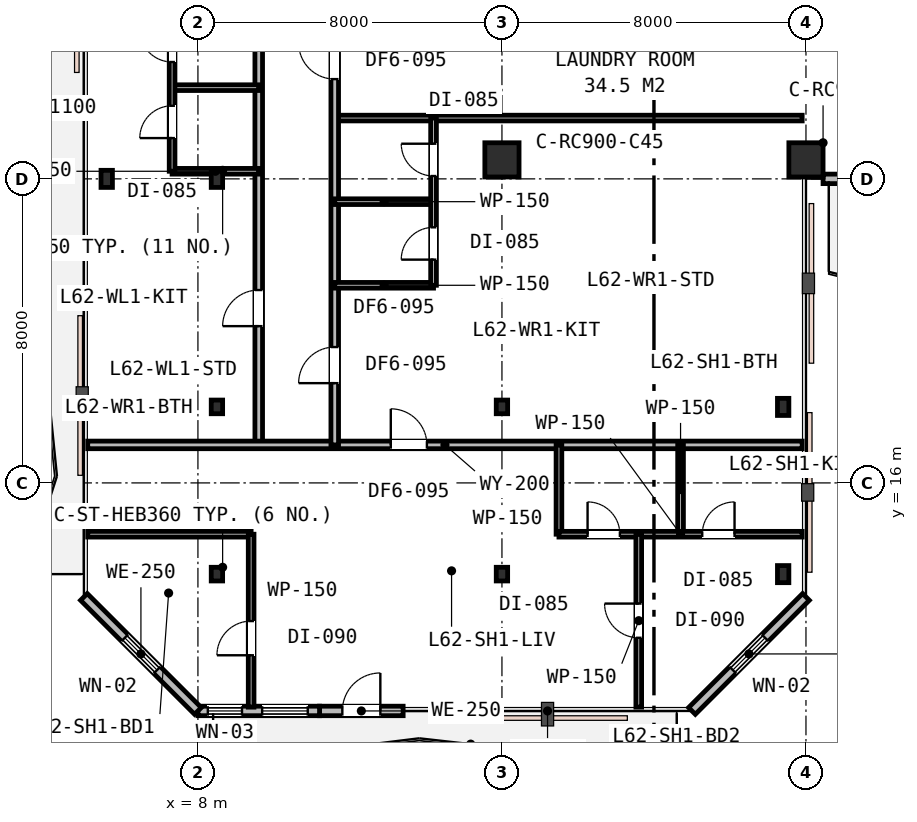
"""IFC4 building model, lengths in metres.
Left out: names, types, materials, properties, quantities, classifications, styles, units other than length and angle.
Written with IfcOpenShell. Run it as: python <this file> out.ifc"""

import sys

from ifc_helpers import new_model, si_unit, direction, frame, frame_2d, origin, origin_2d, place, context, subcontext, project, spatial, rectangle, i_section, extrude, element, fill, save


model = new_model("IFC4")
c1 = context("Model", 3, precision=1e-05, world=origin(), true_north=direction((0.0, 1.0)))
c2 = subcontext(c1, "Body", "Model", "MODEL_VIEW")
j1 = project(units=[si_unit("LENGTHUNIT", "METRE"), si_unit("PLANEANGLEUNIT", "RADIAN")], contexts=[c1])
p1 = place(None, origin())
s1 = spatial("IfcSite", under=j1, at=p1, CompositionType="ELEMENT")
p2 = place(p1, origin())
s2 = spatial("IfcBuilding", under=s1, at=p2, CompositionType="ELEMENT")
p3 = place(p2, frame((0.0, 0.0, 241.2)))
s3 = spatial("IfcBuildingStorey", under=s2, at=p3, CompositionType="ELEMENT", Elevation=241.2)
p4 = place(p3, frame((8.5, 24.0, 0.0), z_axis=(0.0, 0.0, 1.0), x_axis=(1.0, 0.0, 0.0)))
e1 = element("IfcColumn", 1, at=p4, inside=s3, PredefinedType="COLUMN", context=c2, shape_type="SweptSolid", body=[
    extrude(i_section(OverallWidth=0.3, OverallDepth=0.45, WebThickness=0.014, FlangeThickness=0.026, FilletRadius=0.027, at=origin_2d()), origin(), (0.0, 0.0, 1.0), 3.8),
])
for number, where, z_axis, x_axis in (
    (2, (16.0, 24.5, 0.0), (0.0, 0.0, 1.0), (1.0, 0.0, 0.0)),
    (3, (24.0, 24.5, 0.0), (0.0, 0.0, 1.0), (1.0, 0.0, 0.0)),
):
    element("IfcColumn", number, at=place(p3, frame(where, z_axis=z_axis, x_axis=x_axis)), inside=s3, PredefinedType="COLUMN", context=c2, shape_type="SweptSolid", body=[
        extrude(rectangle(XDim=0.9, YDim=0.9, at=origin_2d()), origin(), (0.0, 0.0, 1.0), 3.8),
    ])
for number, where, z_axis, x_axis in (
    (4, (5.6, 24.0, 0.0), (0.0, 0.0, 1.0), (1.0, 0.0, 0.0)),
    (5, (23.4, 13.6, 0.0), (0.0, 0.0, 1.0), (1.0, 0.0, 0.0)),
    (6, (23.4, 18.0, 0.0), (0.0, 0.0, 1.0), (1.0, 0.0, 0.0)),
):
    element("IfcColumn", number, at=place(p3, frame(where, z_axis=z_axis, x_axis=x_axis)), inside=s3, PredefinedType="COLUMN", context=c2, shape_type="SweptSolid", body=[
        extrude(i_section(OverallWidth=0.3, OverallDepth=0.45, WebThickness=0.014, FlangeThickness=0.026, FilletRadius=0.027, at=origin_2d()), origin(), (0.0, 0.0, 1.0), 3.8),
    ])
for number, where, z_axis, x_axis in (
    (7, (8.5, 13.6, 0.0), (0.0, 0.0, 1.0), (1.0, 0.0, 0.0)),
    (8, (16.0, 13.6, 0.0), (0.0, 0.0, 1.0), (1.0, 0.0, 0.0)),
    (9, (8.5, 18.0, 0.0), (0.0, 0.0, 1.0), (1.0, 0.0, 0.0)),
    (10, (16.0, 18.0, 0.0), (0.0, 0.0, 1.0), (1.0, 0.0, 0.0)),
):
    element("IfcColumn", number, at=place(p3, frame(where, z_axis=z_axis, x_axis=x_axis)), inside=s3, PredefinedType="COLUMN", context=c2, shape_type="SweptSolid", body=[
        extrude(i_section(OverallWidth=0.3, OverallDepth=0.36, WebThickness=0.013, FlangeThickness=0.022, FilletRadius=0.027, at=origin_2d()), origin(), (0.0, 0.0, 1.0), 3.8),
    ])
p5 = place(p3, frame((11.2, 10.0, 0.0), z_axis=(0.0, 0.0, 1.0), x_axis=(1.0, 0.0, 0.0)))
e11 = element("IfcWall", 11, at=p5, inside=s3, PredefinedType="STANDARD", context=c2, shape_type="SweptSolid", body=[
    extrude(rectangle(XDim=2.2, YDim=0.25, at=frame_2d((1.1, 0.0))), origin(), (0.0, 0.0, 1.0), 3.53),
])
p6 = place(p5, frame((0.6, 0.0, 0.0)))
e12 = element("IfcOpeningElement", 12, at=p6, cuts=e11, PredefinedType="OPENING", context=c2, shape_type="SweptSolid", body=[
    extrude(rectangle(XDim=1.0, YDim=2.15, at=frame_2d((0.5, 1.075))), frame((0.0, 0.135, 0.0), z_axis=(0.0, -1.0, 0.0), x_axis=(1.0, 0.0, 0.0)), (0.0, 0.0, 1.0), 0.27),
])
p7 = place(p3, frame((8.0, 10.0, 0.0), z_axis=(0.0, 0.0, 1.0), x_axis=(1.0, 0.0, 0.0)))
e13 = element("IfcWall", 13, at=p7, inside=s3, PredefinedType="STANDARD", context=c2, shape_type="SweptSolid", body=[
    extrude(rectangle(XDim=3.2, YDim=0.25, at=frame_2d((1.6, 0.0))), origin(), (0.0, 0.0, 1.0), 3.53),
])
p8 = place(p7, frame((0.26, 0.0, 0.9)))
e14 = element("IfcOpeningElement", 14, at=p8, cuts=e13, PredefinedType="OPENING", context=c2, shape_type="SweptSolid", body=[
    extrude(rectangle(XDim=0.9, YDim=1.55, at=frame_2d((0.45, 0.775))), frame((0.0, 0.135, 0.0), z_axis=(0.0, -1.0, 0.0), x_axis=(1.0, 0.0, 0.0)), (0.0, 0.0, 1.0), 0.27),
])
p9 = place(p7, frame((1.69, 0.0, 0.85)))
e15 = element("IfcOpeningElement", 15, at=p9, cuts=e13, PredefinedType="OPENING", context=c2, shape_type="SweptSolid", body=[
    extrude(rectangle(XDim=1.2, YDim=1.6, at=frame_2d((0.6, 0.8))), frame((0.0, 0.135, 0.0), z_axis=(0.0, -1.0, 0.0), x_axis=(1.0, 0.0, 0.0)), (0.0, 0.0, 1.0), 0.27),
])
p10 = place(p3, frame((21.0, 10.0, 0.0), z_axis=(0.0, 0.0, 1.0), x_axis=(0.707106781187, 0.707106781187, 0.0)))
e16 = element("IfcWall", 16, at=p10, inside=s3, PredefinedType="STANDARD", context=c2, shape_type="SweptSolid", body=[
    extrude(rectangle(XDim=4.243, YDim=0.25, at=frame_2d((2.121, 0.0))), origin(), (0.0, 0.0, 1.0), 3.53),
])
p11 = place(p10, frame((1.521, 0.0, 0.85)))
e17 = element("IfcOpeningElement", 17, at=p11, cuts=e16, PredefinedType="OPENING", context=c2, shape_type="SweptSolid", body=[
    extrude(rectangle(XDim=1.2, YDim=1.6, at=frame_2d((0.6, 0.8))), frame((0.0, 0.135, 0.0), z_axis=(0.0, -1.0, 0.0), x_axis=(1.0, 0.0, 0.0)), (0.0, 0.0, 1.0), 0.27),
])
p12 = place(p3, frame((24.45, 24.0, 0.0), z_axis=(0.0, 0.0, 1.0), x_axis=(1.0, 0.0, 0.0)))
e18 = element("IfcWall", 18, at=p12, inside=s3, PredefinedType="STANDARD", context=c2, shape_type="SweptSolid", body=[
    extrude(rectangle(XDim=0.95, YDim=0.25, at=frame_2d((0.475, 0.0))), origin(), (0.0, 0.0, 1.0), 3.27),
])
p13 = place(p3, frame((5.0, 13.0, 0.0), z_axis=(0.0, 0.0, 1.0), x_axis=(0.707106781187, -0.707106781187, 0.0)))
e19 = element("IfcWall", 19, at=p13, inside=s3, PredefinedType="STANDARD", context=c2, shape_type="SweptSolid", body=[
    extrude(rectangle(XDim=4.243, YDim=0.25, at=frame_2d((2.121, 0.0))), origin(), (0.0, 0.0, 1.0), 3.53),
])
p14 = place(p13, frame((1.521, 0.0, 0.85)))
e20 = element("IfcOpeningElement", 20, at=p14, cuts=e19, PredefinedType="OPENING", context=c2, shape_type="SweptSolid", body=[
    extrude(rectangle(XDim=1.2, YDim=1.6, at=frame_2d((0.6, 0.8))), frame((0.0, 0.135, 0.0), z_axis=(0.0, -1.0, 0.0), x_axis=(1.0, 0.0, 0.0)), (0.0, 0.0, 1.0), 0.27),
])
p15 = place(p3, frame((9.6, 17.0, 0.0), z_axis=(0.0, 0.0, 1.0), x_axis=(0.0, 1.0, 0.0)))
e21 = element("IfcWall", 21, at=p15, inside=s3, PredefinedType="PARTITIONING", context=c2, shape_type="SweptSolid", body=[
    extrude(rectangle(XDim=25.9, YDim=0.2, at=frame_2d((12.95, 0.0))), origin(), (0.0, 0.0, 1.0), 3.16),
])
p16 = place(p15, frame((12.045, 0.0, 0.0)))
e22 = element("IfcOpeningElement", 22, at=p16, cuts=e21, PredefinedType="OPENING", context=c2, shape_type="SweptSolid", body=[
    extrude(rectangle(XDim=0.95, YDim=2.15, at=frame_2d((0.475, 1.075))), frame((0.0, 0.11, 0.0), z_axis=(0.0, -1.0, 0.0), x_axis=(1.0, 0.0, 0.0)), (0.0, 0.0, 1.0), 0.22),
])
p17 = place(p15, frame((3.125, 0.0, 0.0)))
e23 = element("IfcOpeningElement", 23, at=p17, cuts=e21, PredefinedType="OPENING", context=c2, shape_type="SweptSolid", body=[
    extrude(rectangle(XDim=0.95, YDim=2.15, at=frame_2d((0.475, 1.075))), frame((0.0, 0.11, 0.0), z_axis=(0.0, -1.0, 0.0), x_axis=(1.0, 0.0, 0.0)), (0.0, 0.0, 1.0), 0.22),
])
p18 = place(p3, frame((5.1, 17.0, 0.0), z_axis=(0.0, 0.0, 1.0), x_axis=(1.0, 0.0, 0.0)))
e24 = element("IfcWall", 24, at=p18, inside=s3, PredefinedType="PARTITIONING", context=c2, shape_type="SweptSolid", body=[
    extrude(rectangle(XDim=18.8, YDim=0.2, at=frame_2d((9.4, 0.0))), origin(), (0.0, 0.0, 1.0), 3.16),
])
p19 = place(p18, frame((7.975, 0.0, 0.0)))
e25 = element("IfcOpeningElement", 25, at=p19, cuts=e24, PredefinedType="OPENING", context=c2, shape_type="SweptSolid", body=[
    extrude(rectangle(XDim=0.95, YDim=2.15, at=frame_2d((0.475, 1.075))), frame((0.0, 0.11, 0.0), z_axis=(0.0, -1.0, 0.0), x_axis=(1.0, 0.0, 0.0)), (0.0, 0.0, 1.0), 0.22),
])
for number, where, z_axis, x_axis in (
    (26, (7.32, 24.2, 0.0), (0.0, 0.0, 1.0), (1.0, 0.0, 0.0)),
    (27, (7.32, 26.4, 0.0), (0.0, 0.0, 1.0), (1.0, 0.0, 0.0)),
):
    element("IfcWall", number, at=place(p3, frame(where, z_axis=z_axis, x_axis=x_axis)), inside=s3, PredefinedType="PARTITIONING", context=c2, shape_type="SweptSolid", body=[
        extrude(rectangle(XDim=2.28, YDim=0.15, at=frame_2d((1.14, 0.0))), origin(), (0.0, 0.0, 1.0), 3.16),
    ])
p20 = place(p3, frame((7.32, 24.2, 0.0), z_axis=(0.0, 0.0, 1.0), x_axis=(0.0, 1.0, 0.0)))
e28 = element("IfcWall", 28, at=p20, inside=s3, PredefinedType="PARTITIONING", context=c2, shape_type="SweptSolid", body=[
    extrude(rectangle(XDim=4.4, YDim=0.15, at=frame_2d((2.2, 0.0))), origin(), (0.0, 0.0, 1.0), 3.16),
])
p21 = place(p20, frame((0.873, 0.0, 0.0)))
e29 = element("IfcOpeningElement", 29, at=p21, cuts=e28, PredefinedType="OPENING", context=c2, shape_type="SweptSolid", body=[
    extrude(rectangle(XDim=0.85, YDim=2.15, at=frame_2d((0.425, 1.075))), frame((0.0, 0.085, 0.0), z_axis=(0.0, -1.0, 0.0), x_axis=(1.0, 0.0, 0.0)), (0.0, 0.0, 1.0), 0.17),
])
p22 = place(p20, frame((2.875, 0.0, 0.0)))
e30 = element("IfcOpeningElement", 30, at=p22, cuts=e28, PredefinedType="OPENING", context=c2, shape_type="SweptSolid", body=[
    extrude(rectangle(XDim=0.85, YDim=2.15, at=frame_2d((0.425, 1.075))), frame((0.0, 0.085, 0.0), z_axis=(0.0, -1.0, 0.0), x_axis=(1.0, 0.0, 0.0)), (0.0, 0.0, 1.0), 0.17),
])
p23 = place(p3, frame((11.6, 25.6, 0.0), z_axis=(0.0, 0.0, 1.0), x_axis=(1.0, 0.0, 0.0)))
e31 = element("IfcWall", 31, at=p23, inside=s3, PredefinedType="PARTITIONING", context=c2, shape_type="SweptSolid", body=[
    extrude(rectangle(XDim=12.3, YDim=0.15, at=frame_2d((6.15, 0.0))), origin(), (0.0, 0.0, 1.0), 3.16),
])
p24 = place(p3, frame((11.6, 17.0, 0.0), z_axis=(0.0, 0.0, 1.0), x_axis=(0.0, 1.0, 0.0)))
e32 = element("IfcWall", 32, at=p24, inside=s3, PredefinedType="PARTITIONING", context=c2, shape_type="SweptSolid", body=[
    extrude(rectangle(XDim=11.6, YDim=0.2, at=frame_2d((5.8, 0.0))), origin(), (0.0, 0.0, 1.0), 3.16),
])
p25 = place(p24, frame((9.625, 0.0, 0.0)))
e33 = element("IfcOpeningElement", 33, at=p25, cuts=e32, PredefinedType="OPENING", context=c2, shape_type="SweptSolid", body=[
    extrude(rectangle(XDim=0.95, YDim=2.15, at=frame_2d((0.475, 1.075))), frame((0.0, 0.11, 0.0), z_axis=(0.0, -1.0, 0.0), x_axis=(1.0, 0.0, 0.0)), (0.0, 0.0, 1.0), 0.22),
])
p26 = place(p24, frame((1.625, 0.0, 0.0)))
e34 = element("IfcOpeningElement", 34, at=p26, cuts=e32, PredefinedType="OPENING", context=c2, shape_type="SweptSolid", body=[
    extrude(rectangle(XDim=0.95, YDim=2.15, at=frame_2d((0.475, 1.075))), frame((0.0, 0.11, 0.0), z_axis=(0.0, -1.0, 0.0), x_axis=(1.0, 0.0, 0.0)), (0.0, 0.0, 1.0), 0.22),
])
for number, where, z_axis, x_axis in (
    (35, (11.6, 21.2, 0.0), (0.0, 0.0, 1.0), (1.0, 0.0, 0.0)),
    (36, (11.6, 23.4, 0.0), (0.0, 0.0, 1.0), (1.0, 0.0, 0.0)),
):
    element("IfcWall", number, at=place(p3, frame(where, z_axis=z_axis, x_axis=x_axis)), inside=s3, PredefinedType="PARTITIONING", context=c2, shape_type="SweptSolid", body=[
        extrude(rectangle(XDim=2.6, YDim=0.15, at=frame_2d((1.3, 0.0))), origin(), (0.0, 0.0, 1.0), 3.53),
    ])
p27 = place(p3, frame((14.2, 21.2, 0.0), z_axis=(0.0, 0.0, 1.0), x_axis=(0.0, 1.0, 0.0)))
e37 = element("IfcWall", 37, at=p27, inside=s3, PredefinedType="PARTITIONING", context=c2, shape_type="SweptSolid", body=[
    extrude(rectangle(XDim=4.4, YDim=0.15, at=frame_2d((2.2, 0.0))), origin(), (0.0, 0.0, 1.0), 3.16),
])
p28 = place(p27, frame((0.675, 0.0, 0.0)))
e38 = element("IfcOpeningElement", 38, at=p28, cuts=e37, PredefinedType="OPENING", context=c2, shape_type="SweptSolid", body=[
    extrude(rectangle(XDim=0.85, YDim=2.15, at=frame_2d((0.425, 1.075))), frame((0.0, 0.085, 0.0), z_axis=(0.0, -1.0, 0.0), x_axis=(1.0, 0.0, 0.0)), (0.0, 0.0, 1.0), 0.17),
])
p29 = place(p27, frame((2.875, 0.0, 0.0)))
e39 = element("IfcOpeningElement", 39, at=p29, cuts=e37, PredefinedType="OPENING", context=c2, shape_type="SweptSolid", body=[
    extrude(rectangle(XDim=0.85, YDim=2.15, at=frame_2d((0.425, 1.075))), frame((0.0, 0.085, 0.0), z_axis=(0.0, -1.0, 0.0), x_axis=(1.0, 0.0, 0.0)), (0.0, 0.0, 1.0), 0.17),
])
p30 = place(p3, frame((17.5, 14.65, 0.0), z_axis=(0.0, 0.0, 1.0), x_axis=(0.0, 1.0, 0.0)))
e40 = element("IfcWall", 40, at=p30, inside=s3, PredefinedType="PARTITIONING", context=c2, shape_type="SweptSolid", body=[
    extrude(rectangle(XDim=2.35, YDim=0.15, at=frame_2d((1.175, 0.0))), origin(), (0.0, 0.0, 1.0), 3.53),
])
p31 = place(p3, frame((20.7, 14.65, 0.0), z_axis=(0.0, 0.0, 1.0), x_axis=(0.0, 1.0, 0.0)))
e41 = element("IfcWall", 41, at=p31, inside=s3, PredefinedType="PARTITIONING", context=c2, shape_type="SweptSolid", body=[
    extrude(rectangle(XDim=2.35, YDim=0.15, at=frame_2d((1.175, 0.0))), origin(), (0.0, 0.0, 1.0), 3.28),
])
p32 = place(p3, frame((17.5, 14.65, 0.0), z_axis=(0.0, 0.0, 1.0), x_axis=(1.0, 0.0, 0.0)))
e42 = element("IfcWall", 42, at=p32, inside=s3, PredefinedType="PARTITIONING", context=c2, shape_type="SweptSolid", body=[
    extrude(rectangle(XDim=6.4, YDim=0.15, at=frame_2d((3.2, 0.0))), origin(), (0.0, 0.0, 1.0), 3.27),
])
p33 = place(p32, frame((0.753, 0.0, 0.0)))
e43 = element("IfcOpeningElement", 43, at=p33, cuts=e42, PredefinedType="OPENING", context=c2, shape_type="SweptSolid", body=[
    extrude(rectangle(XDim=0.85, YDim=2.15, at=frame_2d((0.425, 1.075))), frame((0.0, 0.085, 0.0), z_axis=(0.0, -1.0, 0.0), x_axis=(1.0, 0.0, 0.0)), (0.0, 0.0, 1.0), 0.17),
])
p34 = place(p32, frame((3.771, 0.0, 0.0)))
e44 = element("IfcOpeningElement", 44, at=p34, cuts=e42, PredefinedType="OPENING", context=c2, shape_type="SweptSolid", body=[
    extrude(rectangle(XDim=0.85, YDim=2.15, at=frame_2d((0.425, 1.075))), frame((0.0, 0.085, 0.0), z_axis=(0.0, -1.0, 0.0), x_axis=(1.0, 0.0, 0.0)), (0.0, 0.0, 1.0), 0.17),
])
p35 = place(p3, frame((5.1, 14.65, 0.0), z_axis=(0.0, 0.0, 1.0), x_axis=(1.0, 0.0, 0.0)))
e45 = element("IfcWall", 45, at=p35, inside=s3, PredefinedType="PARTITIONING", context=c2, shape_type="SweptSolid", body=[
    extrude(rectangle(XDim=4.3, YDim=0.15, at=frame_2d((2.15, 0.0))), origin(), (0.0, 0.0, 1.0), 3.16),
])
p36 = place(p3, frame((9.4, 10.1, 0.0), z_axis=(0.0, 0.0, 1.0), x_axis=(0.0, 1.0, 0.0)))
e46 = element("IfcWall", 46, at=p36, inside=s3, PredefinedType="PARTITIONING", context=c2, shape_type="SweptSolid", body=[
    extrude(rectangle(XDim=4.55, YDim=0.15, at=frame_2d((2.275, 0.0))), origin(), (0.0, 0.0, 1.0), 3.16),
])
p37 = place(p36, frame((1.365, 0.0, 0.0)))
e47 = element("IfcOpeningElement", 47, at=p37, cuts=e46, PredefinedType="OPENING", context=c2, shape_type="SweptSolid", body=[
    extrude(rectangle(XDim=0.9, YDim=2.15, at=frame_2d((0.45, 1.075))), frame((0.0, 0.085, 0.0), z_axis=(0.0, -1.0, 0.0), x_axis=(1.0, 0.0, 0.0)), (0.0, 0.0, 1.0), 0.17),
])
p38 = place(p3, frame((19.6, 10.1, 0.0), z_axis=(0.0, 0.0, 1.0), x_axis=(0.0, 1.0, 0.0)))
e48 = element("IfcWall", 48, at=p38, inside=s3, PredefinedType="PARTITIONING", context=c2, shape_type="SweptSolid", body=[
    extrude(rectangle(XDim=4.55, YDim=0.15, at=frame_2d((2.275, 0.0))), origin(), (0.0, 0.0, 1.0), 3.16),
])
p39 = place(p38, frame((1.825, 0.0, 0.0)))
e49 = element("IfcOpeningElement", 49, at=p39, cuts=e48, PredefinedType="OPENING", context=c2, shape_type="SweptSolid", body=[
    extrude(rectangle(XDim=0.9, YDim=2.15, at=frame_2d((0.45, 1.075))), frame((0.0, 0.085, 0.0), z_axis=(0.0, -1.0, 0.0), x_axis=(1.0, 0.0, 0.0)), (0.0, 0.0, 1.0), 0.17),
])
p40 = place(p6, origin())
e50 = element("IfcDoor", 50, at=p40, inside=s3, OperationType="SINGLE_SWING_RIGHT", PredefinedType="DOOR", context=c2, shape_type="SweptSolid", body=[
    extrude(rectangle(XDim=1.0, YDim=2.15, at=frame_2d((0.5, 1.075))), frame((0.0, 0.025, 0.0), z_axis=(0.0, -1.0, 0.0), x_axis=(1.0, 0.0, 0.0)), (0.0, 0.0, 1.0), 0.05),
])
fill(e12, e50)
p41 = place(p8, origin())
e51 = element("IfcWindow", 51, at=p41, inside=s3, PartitioningType="SINGLE_PANEL", PredefinedType="WINDOW", context=c2, shape_type="SweptSolid", body=[
    extrude(rectangle(XDim=0.9, YDim=1.55, at=frame_2d((0.45, 0.775))), frame((0.0, 0.03, 0.0), z_axis=(0.0, -1.0, 0.0), x_axis=(1.0, 0.0, 0.0)), (0.0, 0.0, 1.0), 0.06),
])
fill(e14, e51)
p42 = place(p9, origin())
e52 = element("IfcWindow", 52, at=p42, inside=s3, PartitioningType="SINGLE_PANEL", PredefinedType="WINDOW", context=c2, shape_type="SweptSolid", body=[
    extrude(rectangle(XDim=1.2, YDim=1.6, at=frame_2d((0.6, 0.8))), frame((0.0, 0.03, 0.0), z_axis=(0.0, -1.0, 0.0), x_axis=(1.0, 0.0, 0.0)), (0.0, 0.0, 1.0), 0.06),
])
fill(e15, e52)
p43 = place(p11, origin())
e53 = element("IfcWindow", 53, at=p43, inside=s3, PartitioningType="SINGLE_PANEL", PredefinedType="WINDOW", context=c2, shape_type="SweptSolid", body=[
    extrude(rectangle(XDim=1.2, YDim=1.6, at=frame_2d((0.6, 0.8))), frame((0.0, 0.03, 0.0), z_axis=(0.0, -1.0, 0.0), x_axis=(1.0, 0.0, 0.0)), (0.0, 0.0, 1.0), 0.06),
])
fill(e17, e53)
p44 = place(p14, origin())
e54 = element("IfcWindow", 54, at=p44, inside=s3, PartitioningType="SINGLE_PANEL", PredefinedType="WINDOW", context=c2, shape_type="SweptSolid", body=[
    extrude(rectangle(XDim=1.2, YDim=1.6, at=frame_2d((0.6, 0.8))), frame((0.0, 0.03, 0.0), z_axis=(0.0, -1.0, 0.0), x_axis=(1.0, 0.0, 0.0)), (0.0, 0.0, 1.0), 0.06),
])
fill(e20, e54)
p45 = place(p17, origin())
e55 = element("IfcDoor", 55, at=p45, inside=s3, OperationType="SINGLE_SWING_LEFT", PredefinedType="DOOR", context=c2, shape_type="SweptSolid", body=[
    extrude(rectangle(XDim=0.95, YDim=2.15, at=frame_2d((0.475, 1.075))), frame((0.0, 0.025, 0.0), z_axis=(0.0, -1.0, 0.0), x_axis=(1.0, 0.0, 0.0)), (0.0, 0.0, 1.0), 0.05),
])
fill(e23, e55)
p46 = place(p21, origin())
e56 = element("IfcDoor", 56, at=p46, inside=s3, OperationType="SINGLE_SWING_LEFT", PredefinedType="DOOR", context=c2, shape_type="SweptSolid", body=[
    extrude(rectangle(XDim=0.85, YDim=2.15, at=frame_2d((0.425, 1.075))), frame((0.0, 0.025, 0.0), z_axis=(0.0, -1.0, 0.0), x_axis=(1.0, 0.0, 0.0)), (0.0, 0.0, 1.0), 0.05),
])
fill(e29, e56)
p47 = place(p22, origin())
e57 = element("IfcDoor", 57, at=p47, inside=s3, OperationType="SINGLE_SWING_RIGHT", PredefinedType="DOOR", context=c2, shape_type="SweptSolid", body=[
    extrude(rectangle(XDim=0.85, YDim=2.15, at=frame_2d((0.425, 1.075))), frame((0.0, 0.025, 0.0), z_axis=(0.0, -1.0, 0.0), x_axis=(1.0, 0.0, 0.0)), (0.0, 0.0, 1.0), 0.05),
])
fill(e30, e57)
p48 = place(p25, origin())
e58 = element("IfcDoor", 58, at=p48, inside=s3, OperationType="SINGLE_SWING_RIGHT", PredefinedType="DOOR", context=c2, shape_type="SweptSolid", body=[
    extrude(rectangle(XDim=0.95, YDim=2.15, at=frame_2d((0.475, 1.075))), frame((0.0, 0.025, 0.0), z_axis=(0.0, -1.0, 0.0), x_axis=(1.0, 0.0, 0.0)), (0.0, 0.0, 1.0), 0.05),
])
fill(e33, e58)
p49 = place(p26, origin())
e59 = element("IfcDoor", 59, at=p49, inside=s3, OperationType="SINGLE_SWING_LEFT", PredefinedType="DOOR", context=c2, shape_type="SweptSolid", body=[
    extrude(rectangle(XDim=0.95, YDim=2.15, at=frame_2d((0.475, 1.075))), frame((0.0, 0.025, 0.0), z_axis=(0.0, -1.0, 0.0), x_axis=(1.0, 0.0, 0.0)), (0.0, 0.0, 1.0), 0.05),
])
fill(e34, e59)
p50 = place(p28, origin())
e60 = element("IfcDoor", 60, at=p50, inside=s3, OperationType="SINGLE_SWING_LEFT", PredefinedType="DOOR", context=c2, shape_type="SweptSolid", body=[
    extrude(rectangle(XDim=0.85, YDim=2.15, at=frame_2d((0.425, 1.075))), frame((0.0, 0.025, 0.0), z_axis=(0.0, -1.0, 0.0), x_axis=(1.0, 0.0, 0.0)), (0.0, 0.0, 1.0), 0.05),
])
fill(e38, e60)
p51 = place(p29, origin())
e61 = element("IfcDoor", 61, at=p51, inside=s3, OperationType="SINGLE_SWING_RIGHT", PredefinedType="DOOR", context=c2, shape_type="SweptSolid", body=[
    extrude(rectangle(XDim=0.85, YDim=2.15, at=frame_2d((0.425, 1.075))), frame((0.0, 0.025, 0.0), z_axis=(0.0, -1.0, 0.0), x_axis=(1.0, 0.0, 0.0)), (0.0, 0.0, 1.0), 0.05),
])
fill(e39, e61)
p52 = place(p19, origin())
e62 = element("IfcDoor", 62, at=p52, inside=s3, OperationType="SINGLE_SWING_LEFT", PredefinedType="DOOR", context=c2, shape_type="SweptSolid", body=[
    extrude(rectangle(XDim=0.95, YDim=2.15, at=frame_2d((0.475, 1.075))), frame((0.0, 0.025, 0.0), z_axis=(0.0, -1.0, 0.0), x_axis=(1.0, 0.0, 0.0)), (0.0, 0.0, 1.0), 0.05),
])
fill(e25, e62)
p53 = place(p33, origin())
e63 = element("IfcDoor", 63, at=p53, inside=s3, OperationType="SINGLE_SWING_LEFT", PredefinedType="DOOR", context=c2, shape_type="SweptSolid", body=[
    extrude(rectangle(XDim=0.85, YDim=2.15, at=frame_2d((0.425, 1.075))), frame((0.0, 0.025, 0.0), z_axis=(0.0, -1.0, 0.0), x_axis=(1.0, 0.0, 0.0)), (0.0, 0.0, 1.0), 0.05),
])
fill(e43, e63)
p54 = place(p34, origin())
e64 = element("IfcDoor", 64, at=p54, inside=s3, OperationType="SINGLE_SWING_RIGHT", PredefinedType="DOOR", context=c2, shape_type="SweptSolid", body=[
    extrude(rectangle(XDim=0.85, YDim=2.15, at=frame_2d((0.425, 1.075))), frame((0.0, 0.025, 0.0), z_axis=(0.0, -1.0, 0.0), x_axis=(1.0, 0.0, 0.0)), (0.0, 0.0, 1.0), 0.05),
])
fill(e44, e64)
p55 = place(p37, origin())
e65 = element("IfcDoor", 65, at=p55, inside=s3, OperationType="SINGLE_SWING_LEFT", PredefinedType="DOOR", context=c2, shape_type="SweptSolid", body=[
    extrude(rectangle(XDim=0.9, YDim=2.15, at=frame_2d((0.45, 1.075))), frame((0.0, 0.025, 0.0), z_axis=(0.0, -1.0, 0.0), x_axis=(1.0, 0.0, 0.0)), (0.0, 0.0, 1.0), 0.05),
])
fill(e47, e65)
p56 = place(p39, origin())
e66 = element("IfcDoor", 66, at=p56, inside=s3, OperationType="SINGLE_SWING_RIGHT", PredefinedType="DOOR", context=c2, shape_type="SweptSolid", body=[
    extrude(rectangle(XDim=0.9, YDim=2.15, at=frame_2d((0.45, 1.075))), frame((0.0, 0.025, 0.0), z_axis=(0.0, -1.0, 0.0), x_axis=(1.0, 0.0, 0.0)), (0.0, 0.0, 1.0), 0.05),
])
fill(e49, e66)
save(model, sys.argv[1])
